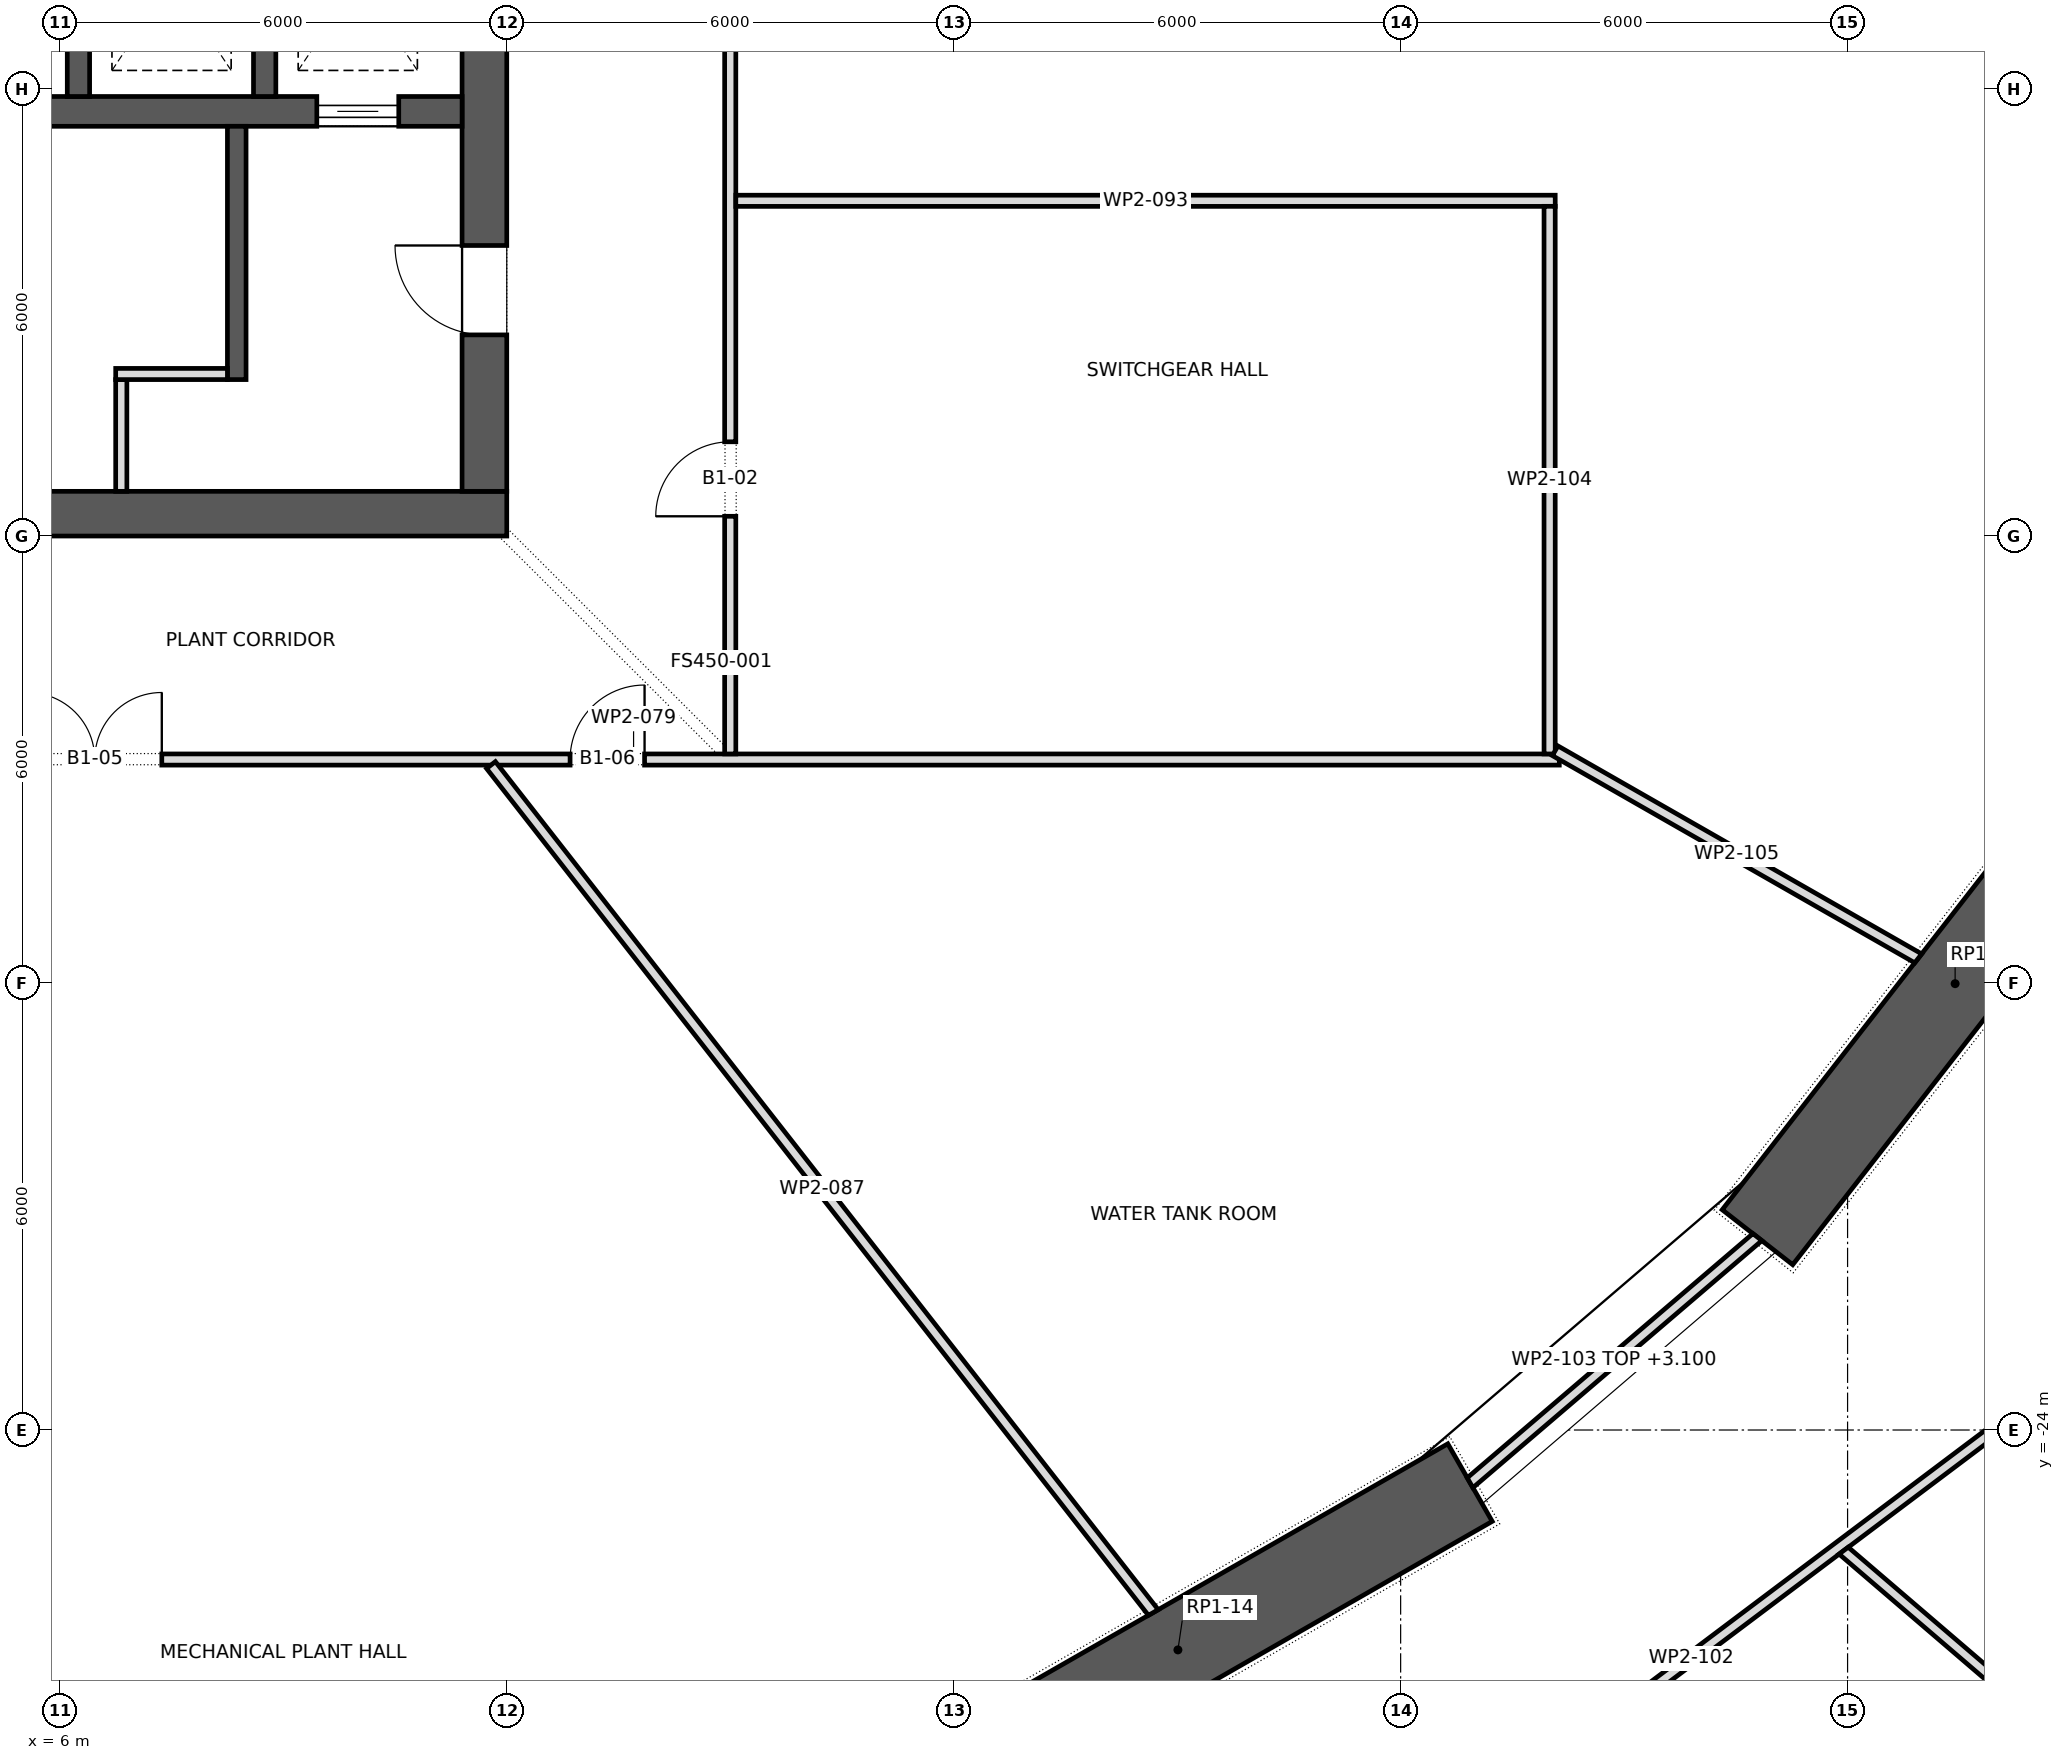
"""IFC4 building model, lengths in metres.
Left out: names, types, materials, properties, quantities, classifications, styles, units other than length and angle.
Written with IfcOpenShell. Run it as: python <this file> out.ifc"""

import sys

from ifc_helpers import new_model, si_unit, direction, frame, frame_2d, origin, place, context, subcontext, project, spatial, polyline, rectangle, outline, extrude, element, fill, save


model = new_model("IFC4")
c1 = context("Model", 3, precision=1e-05, world=origin(), true_north=direction((0.0, 1.0)))
c2 = subcontext(c1, "Body", "Model", "MODEL_VIEW")
j1 = project(units=[si_unit("LENGTHUNIT", "METRE"), si_unit("PLANEANGLEUNIT", "RADIAN")], contexts=[c1])
p1 = place(None, origin())
s1 = spatial("IfcSite", under=j1, at=p1, CompositionType="ELEMENT")
p2 = place(p1, origin())
s2 = spatial("IfcBuilding", under=s1, at=p2, CompositionType="ELEMENT")
p3 = place(p2, frame((0.0, 0.0, -4.0)))
s3 = spatial("IfcBuildingStorey", under=s2, at=p3, CompositionType="ELEMENT", Elevation=-4.0)
p4 = place(p3, frame((17.089, -29.198, 0.0), z_axis=(0.0, 0.0, 1.0), x_axis=(0.867760656864, 0.496982336103, 0.0)))
e1 = element("IfcWall", 1, at=p4, inside=s3, PredefinedType="SHEAR", context=c2, shape_type="SweptSolid", body=[
    extrude(rectangle(XDim=9.038, YDim=1.2, at=frame_2d((4.519, 0.0))), origin(), (0.0, 0.0, 1.0), 4.0),
])
p5 = place(p3, frame((28.79, -21.412, 0.0), z_axis=(0.0, 0.0, 1.0), x_axis=(0.614825322247, 0.788663314174, 0.0)))
e2 = element("IfcWall", 2, at=p5, inside=s3, PredefinedType="SHEAR", context=c2, shape_type="SweptSolid", body=[
    extrude(rectangle(XDim=8.632, YDim=1.2, at=frame_2d((4.316, 0.0))), origin(), (0.0, 0.0, 1.0), 4.0),
])
p6 = place(p3, frame((-12.0, -11.7, 0.0), z_axis=(0.0, 0.0, 1.0), x_axis=(1.0, 0.0, 0.0)))
e3 = element("IfcWall", 3, at=p6, inside=s3, PredefinedType="SHEAR", context=c2, shape_type="SweptSolid", body=[
    extrude(rectangle(XDim=24.0, YDim=0.6, at=frame_2d((12.0, 0.0))), origin(), (0.0, 0.0, 1.0), 4.0),
])
p7 = place(p6, frame((10.15, 0.0, 0.0)))
e4 = element("IfcOpeningElement", 4, at=p7, cuts=e3, PredefinedType="OPENING", context=c2, shape_type="SweptSolid", body=[
    extrude(rectangle(XDim=0.9, YDim=2.1, at=frame_2d((0.45, 1.05))), frame((0.0, 0.312, 0.0), z_axis=(0.0, -1.0, 0.0), x_axis=(1.0, 0.0, 0.0)), (0.0, 0.0, 1.0), 0.624),
])
p8 = place(p3, frame((11.7, -11.4, 0.0), z_axis=(0.0, 0.0, 1.0), x_axis=(0.0, 1.0, 0.0)))
e5 = element("IfcWall", 5, at=p8, inside=s3, PredefinedType="SHEAR", context=c2, shape_type="SweptSolid", body=[
    extrude(rectangle(XDim=22.8, YDim=0.6, at=frame_2d((11.4, 0.0))), origin(), (0.0, 0.0, 1.0), 4.0),
])
p9 = place(p8, frame((10.2, 0.0, 0.0)))
e6 = element("IfcOpeningElement", 6, at=p9, cuts=e5, PredefinedType="OPENING", context=c2, shape_type="SweptSolid", body=[
    extrude(rectangle(XDim=2.4, YDim=2.1, at=frame_2d((1.2, 1.05))), frame((0.0, 0.312, 0.0), z_axis=(0.0, -1.0, 0.0), x_axis=(1.0, 0.0, 0.0)), (0.0, 0.0, 1.0), 0.624),
])
p10 = place(p8, frame((19.5, 0.0, 0.0)))
e7 = element("IfcOpeningElement", 7, at=p10, cuts=e5, PredefinedType="OPENING", context=c2, shape_type="SweptSolid", body=[
    extrude(rectangle(XDim=1.2, YDim=2.1, at=frame_2d((0.6, 1.05))), frame((0.0, 0.312, 0.0), z_axis=(0.0, -1.0, 0.0), x_axis=(1.0, 0.0, 0.0)), (0.0, 0.0, 1.0), 0.624),
])
p11 = place(p8, frame((2.1, 0.0, 0.0)))
e8 = element("IfcOpeningElement", 8, at=p11, cuts=e5, PredefinedType="OPENING", context=c2, shape_type="SweptSolid", body=[
    extrude(rectangle(XDim=1.2, YDim=2.1, at=frame_2d((0.6, 1.05))), frame((0.0, 0.312, 0.0), z_axis=(0.0, -1.0, 0.0), x_axis=(1.0, 0.0, 0.0)), (0.0, 0.0, 1.0), 0.624),
])
p12 = place(p3, frame((-11.4, -6.3, 0.0), z_axis=(0.0, 0.0, 1.0), x_axis=(1.0, 0.0, 0.0)))
e9 = element("IfcWall", 9, at=p12, inside=s3, PredefinedType="SHEAR", context=c2, shape_type="SweptSolid", body=[
    extrude(rectangle(XDim=22.8, YDim=0.4, at=frame_2d((11.4, 0.0))), origin(), (0.0, 0.0, 1.0), 4.0),
])
p13 = place(p12, frame((20.85, 0.0, 0.0)))
e10 = element("IfcOpeningElement", 10, at=p13, cuts=e9, PredefinedType="OPENING", context=c2, shape_type="SweptSolid", body=[
    extrude(rectangle(XDim=1.1, YDim=2.1, at=frame_2d((0.55, 1.05))), frame((0.0, 0.212, 0.0), z_axis=(0.0, -1.0, 0.0), x_axis=(1.0, 0.0, 0.0)), (0.0, 0.0, 1.0), 0.424),
])
for number, where, z_axis, x_axis in (
    (11, (6.25, -6.1, 0.0), (0.0, 0.0, 1.0), (0.0, 1.0, 0.0)),
    (12, (8.75, -6.1, 0.0), (0.0, 0.0, 1.0), (0.0, 1.0, 0.0)),
):
    element("IfcWall", number, at=place(p3, frame(where, z_axis=z_axis, x_axis=x_axis)), inside=s3, PredefinedType="SHEAR", context=c2, shape_type="SweptSolid", body=[
        extrude(rectangle(XDim=2.9, YDim=0.3, at=frame_2d((1.45, 0.0))), origin(), (0.0, 0.0, 1.0), 4.0),
    ])
p14 = place(p3, frame((8.375, -9.9, 0.0), z_axis=(0.0, 0.0, 1.0), x_axis=(0.0, 1.0, 0.0)))
e13 = element("IfcWall", 13, at=p14, inside=s3, PredefinedType="SHEAR", context=c2, shape_type="SweptSolid", body=[
    extrude(rectangle(XDim=3.4, YDim=0.25, at=frame_2d((1.7, 0.0))), origin(), (0.0, 0.0, 1.0), 3.55),
])
for number, where, z_axis, x_axis in (
    (14, (6.825, -11.4, 0.0), (0.0, 0.0, 1.0), (0.0, 1.0, 0.0)),
    (15, (6.75, -9.825, 0.0), (0.0, 0.0, 1.0), (1.0, 0.0, 0.0)),
):
    element("IfcWall", number, at=place(p3, frame(where, z_axis=z_axis, x_axis=x_axis)), inside=s3, PredefinedType="PARTITIONING", context=c2, shape_type="SweptSolid", body=[
        extrude(rectangle(XDim=1.5, YDim=0.15, at=frame_2d((0.75, 0.0))), origin(), (0.0, 0.0, 1.0), 3.55),
    ])
p15 = place(p3, frame((1.275, -15.0, 0.0), z_axis=(0.0, 0.0, 1.0), x_axis=(1.0, 0.0, 0.0)))
e16 = element("IfcWall", 16, at=p15, inside=s3, PredefinedType="PARTITIONING", context=c2, shape_type="SweptSolid", body=[
    extrude(rectangle(XDim=24.855, YDim=0.15, at=frame_2d((12.427, 0.0))), origin(), (0.0, 0.0, 1.0), 3.55),
])
p16 = place(p15, frame((4.294, 0.0, 0.0)))
e17 = element("IfcOpeningElement", 17, at=p16, cuts=e16, PredefinedType="OPENING", context=c2, shape_type="SweptSolid", body=[
    extrude(rectangle(XDim=1.8, YDim=2.1, at=frame_2d((0.9, 1.05))), frame((0.0, 0.087, 0.0), z_axis=(0.0, -1.0, 0.0), x_axis=(1.0, 0.0, 0.0)), (0.0, 0.0, 1.0), 0.174),
])
p17 = place(p15, frame((11.575, 0.0, 0.0)))
e18 = element("IfcOpeningElement", 18, at=p17, cuts=e16, PredefinedType="OPENING", context=c2, shape_type="SweptSolid", body=[
    extrude(rectangle(XDim=1.0, YDim=2.1, at=frame_2d((0.5, 1.05))), frame((0.0, 0.087, 0.0), z_axis=(0.0, -1.0, 0.0), x_axis=(1.0, 0.0, 0.0)), (0.0, 0.0, 1.0), 0.174),
])
p18 = place(p3, frame((11.788, -15.074, 0.0), z_axis=(0.0, 0.0, 1.0), x_axis=(0.615848120598, -0.787864894735, 0.0)))
e19 = element("IfcWall", 19, at=p18, inside=s3, PredefinedType="PARTITIONING", context=c2, shape_type="SweptSolid", body=[
    extrude(outline(polyline([(0.0, -0.075), (14.428, -0.075), (14.449, 0.075), (0.0, 0.075), (0.0, -0.075)])), origin(), (0.0, 0.0, 1.0), 3.55),
])
p19 = place(p3, frame((15.0, -14.925, 0.0), z_axis=(0.0, 0.0, 1.0), x_axis=(0.0, 1.0, 0.0)))
e20 = element("IfcWall", 20, at=p19, inside=s3, PredefinedType="PARTITIONING", context=c2, shape_type="SweptSolid", body=[
    extrude(rectangle(XDim=29.85, YDim=0.15, at=frame_2d((14.925, 0.0))), origin(), (0.0, 0.0, 1.0), 3.55),
])
p20 = place(p19, frame((25.66, 0.0, 0.0)))
e21 = element("IfcOpeningElement", 21, at=p20, cuts=e20, PredefinedType="OPENING", context=c2, shape_type="SweptSolid", body=[
    extrude(rectangle(XDim=1.0, YDim=2.1, at=frame_2d((0.5, 1.05))), frame((0.0, 0.087, 0.0), z_axis=(0.0, -1.0, 0.0), x_axis=(1.0, 0.0, 0.0)), (0.0, 0.0, 1.0), 0.174),
])
p21 = place(p19, frame((3.19, 0.0, 0.0)))
e22 = element("IfcOpeningElement", 22, at=p21, cuts=e20, PredefinedType="OPENING", context=c2, shape_type="SweptSolid", body=[
    extrude(rectangle(XDim=1.0, YDim=2.1, at=frame_2d((0.5, 1.05))), frame((0.0, 0.087, 0.0), z_axis=(0.0, -1.0, 0.0), x_axis=(1.0, 0.0, 0.0)), (0.0, 0.0, 1.0), 0.174),
])
p22 = place(p19, frame((13.725, 0.0, 0.0)))
e23 = element("IfcOpeningElement", 23, at=p22, cuts=e20, PredefinedType="OPENING", context=c2, shape_type="SweptSolid", body=[
    extrude(rectangle(XDim=2.4, YDim=2.1, at=frame_2d((1.2, 1.05))), frame((0.0, 0.087, 0.0), z_axis=(0.0, -1.0, 0.0), x_axis=(1.0, 0.0, 0.0)), (0.0, 0.0, 1.0), 0.174),
])
p23 = place(p3, frame((15.075, -7.5, 0.0), z_axis=(0.0, 0.0, 1.0), x_axis=(1.0, 0.0, 0.0)))
e24 = element("IfcWall", 24, at=p23, inside=s3, PredefinedType="PARTITIONING", context=c2, shape_type="SweptSolid", body=[
    extrude(rectangle(XDim=11.0, YDim=0.15, at=frame_2d((5.5, 0.0))), origin(), (0.0, 0.0, 1.0), 3.55),
])
p24 = place(p3, frame((23.696, -30.228, 0.0), z_axis=(0.0, 0.0, 1.0), x_axis=(0.799195100787, 0.601071701944, 0.0)))
e25 = element("IfcWall", 25, at=p24, inside=s3, PredefinedType="PARTITIONING", context=c2, shape_type="SweptSolid", body=[
    extrude(rectangle(XDim=10.529, YDim=0.15, at=frame_2d((5.264, 0.0))), origin(), (0.0, 0.0, 1.0), 3.55),
])
p25 = place(p3, frame((24.932, -24.708, 0.0), z_axis=(0.0, 0.0, 1.0), x_axis=(0.760084552743, 0.649824185978, 0.0)))
e26 = element("IfcWall", 26, at=p25, inside=s3, PredefinedType="PARTITIONING", context=c2, shape_type="SweptSolid", body=[
    extrude(outline(polyline([(-0.014, -0.075), (5.09, -0.075), (5.06, 0.075), (0.014, 0.075), (-0.014, -0.075)])), origin(), (0.0, 0.0, 1.0), 3.1),
])
p26 = place(p3, frame((26.0, -14.925, 0.0), z_axis=(0.0, 0.0, 1.0), x_axis=(0.0, 1.0, 0.0)))
e27 = element("IfcWall", 27, at=p26, inside=s3, PredefinedType="PARTITIONING", context=c2, shape_type="SweptSolid", body=[
    extrude(rectangle(XDim=7.351, YDim=0.15, at=frame_2d((3.676, 0.0))), origin(), (0.0, 0.0, 1.0), 3.55),
])
p27 = place(p3, frame((26.074, -14.882, 0.0), z_axis=(0.0, 0.0, 1.0), x_axis=(0.868133416031, -0.496330909746, 0.0)))
e28 = element("IfcWall", 28, at=p27, inside=s3, PredefinedType="PARTITIONING", context=c2, shape_type="SweptSolid", body=[
    extrude(outline(polyline([(0.0, -0.075), (5.604, -0.075), (5.626, 0.075), (0.0, 0.075), (0.0, -0.075)])), origin(), (0.0, 0.0, 1.0), 3.55),
])
p28 = place(p3, frame((29.947, -25.619, 0.0), z_axis=(0.0, 0.0, 1.0), x_axis=(0.759265306208, -0.650781218836, 0.0)))
e29 = element("IfcWall", 29, at=p28, inside=s3, PredefinedType="PARTITIONING", context=c2, shape_type="SweptSolid", body=[
    extrude(outline(polyline([(-0.017, -0.075), (9.888, -0.075), (9.911, 0.075), (0.017, 0.075), (-0.017, -0.075)])), origin(), (0.0, 0.0, 1.0), 3.55),
])
p29 = place(p13, origin())
e30 = element("IfcDoor", 30, at=p29, inside=s3, OperationType="SLIDING_TO_LEFT", PredefinedType="DOOR", context=c2, shape_type="SweptSolid", body=[
    extrude(rectangle(XDim=1.1, YDim=2.1, at=frame_2d((0.55, 1.05))), frame((0.0, 0.025, 0.0), z_axis=(0.0, -1.0, 0.0), x_axis=(1.0, 0.0, 0.0)), (0.0, 0.0, 1.0), 0.05),
])
fill(e10, e30)
p30 = place(p11, origin())
e31 = element("IfcDoor", 31, at=p30, inside=s3, OperationType="SINGLE_SWING_LEFT", PredefinedType="DOOR", context=c2, shape_type="SweptSolid", body=[
    extrude(rectangle(XDim=1.2, YDim=2.1, at=frame_2d((0.6, 1.05))), frame((0.0, 0.025, 0.0), z_axis=(0.0, -1.0, 0.0), x_axis=(1.0, 0.0, 0.0)), (0.0, 0.0, 1.0), 0.05),
])
fill(e8, e31)
p31 = place(p21, origin())
e32 = element("IfcDoor", 32, at=p31, inside=s3, OperationType="SINGLE_SWING_RIGHT", PredefinedType="DOOR", context=c2, shape_type="SweptSolid", body=[
    extrude(rectangle(XDim=1.0, YDim=2.1, at=frame_2d((0.5, 1.05))), frame((0.0, 0.025, 0.0), z_axis=(0.0, -1.0, 0.0), x_axis=(1.0, 0.0, 0.0)), (0.0, 0.0, 1.0), 0.05),
])
fill(e22, e32)
p32 = place(p16, origin())
e33 = element("IfcDoor", 33, at=p32, inside=s3, OperationType="DOUBLE_DOOR_SINGLE_SWING", PredefinedType="DOOR", context=c2, shape_type="SweptSolid", body=[
    extrude(rectangle(XDim=1.8, YDim=2.1, at=frame_2d((0.9, 1.05))), frame((0.0, 0.025, 0.0), z_axis=(0.0, -1.0, 0.0), x_axis=(1.0, 0.0, 0.0)), (0.0, 0.0, 1.0), 0.05),
])
fill(e17, e33)
p33 = place(p17, origin())
e34 = element("IfcDoor", 34, at=p33, inside=s3, OperationType="SINGLE_SWING_LEFT", PredefinedType="DOOR", context=c2, shape_type="SweptSolid", body=[
    extrude(rectangle(XDim=1.0, YDim=2.1, at=frame_2d((0.5, 1.05))), frame((0.0, 0.025, 0.0), z_axis=(0.0, -1.0, 0.0), x_axis=(1.0, 0.0, 0.0)), (0.0, 0.0, 1.0), 0.05),
])
fill(e18, e34)
save(model, sys.argv[1])
